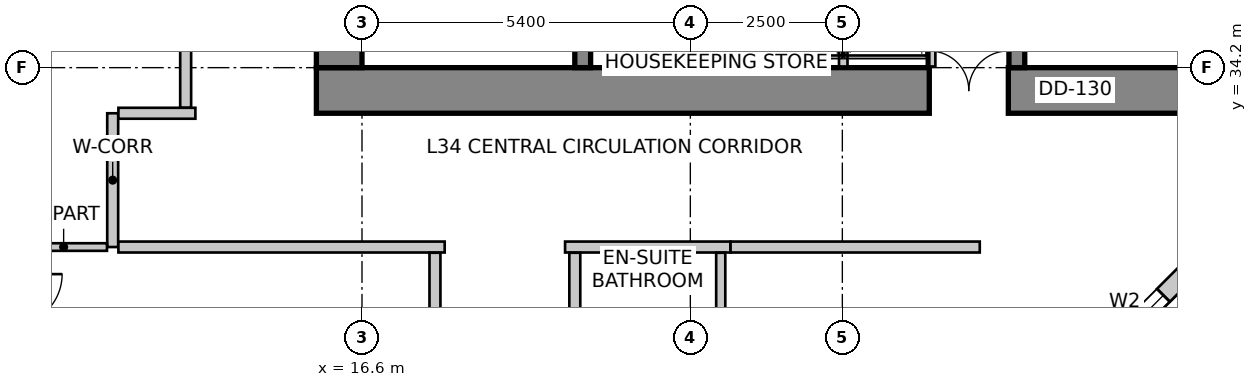
"""IFC4 building model, lengths in metres.
Left out: names, types, materials, properties, quantities, classifications, styles, units other than length and angle.
Written with IfcOpenShell. Run it as: python <this file> out.ifc"""

import sys

from ifc_helpers import new_model, si_unit, direction, frame, frame_2d, origin, place, context, subcontext, project, spatial, rectangle, extrude, source, transform, mapped, element, fill, save


model = new_model("IFC4")
c1 = context("Model", 3, precision=1e-05, world=origin(), true_north=direction((0.0, 1.0)))
c2 = subcontext(c1, "Body", "Model", "MODEL_VIEW")
j1 = project(units=[si_unit("LENGTHUNIT", "METRE"), si_unit("PLANEANGLEUNIT", "RADIAN")], contexts=[c1])
p1 = place(None, origin())
s1 = spatial("IfcSite", under=j1, at=p1, CompositionType="ELEMENT")
p2 = place(p1, origin())
s2 = spatial("IfcBuilding", under=s1, at=p2, CompositionType="ELEMENT")
p3 = place(p2, frame((0.0, 0.0, 139.4)))
s3 = spatial("IfcBuildingStorey", under=s2, at=p3, CompositionType="ELEMENT", Elevation=139.4)
p4 = place(p3, frame((15.85, 33.825, 0.0), z_axis=(0.0, 0.0, 1.0), x_axis=(1.0, 0.0, 0.0)))
e1 = element("IfcWall", 1, at=p4, inside=s3, PredefinedType="SHEAR", context=c2, shape_type="SweptSolid", body=[
    extrude(rectangle(XDim=15.9, YDim=0.75, at=frame_2d((7.95, 0.0))), origin(), (0.0, 0.0, 1.0), 3.6),
])
m1 = source(origin(), c2, "Body", "SweptSolid", [
    extrude(rectangle(XDim=1.3, YDim=2.15, at=frame_2d((0.65, 1.075))), frame((0.0, 0.385, 0.0), z_axis=(0.0, -1.0, 0.0), x_axis=(1.0, 0.0, 0.0)), (0.0, 0.0, 1.0), 0.77),
])
p5 = place(p4, frame((10.08, 0.0, 0.0)))
e2 = element("IfcOpeningElement", 2, at=p5, cuts=e1, PredefinedType="OPENING", context=c2, shape_type="MappedRepresentation", body=[
    mapped(m1, transform((0.0, 0.0, 0.0), scale=1.0)),
])
p6 = place(p3, frame((16.225, 34.2, 0.0), z_axis=(0.0, 0.0, 1.0), x_axis=(0.0, 1.0, 0.0)))
e3 = element("IfcWall", 3, at=p6, inside=s3, PredefinedType="SHEAR", context=c2, shape_type="SweptSolid", body=[
    extrude(rectangle(XDim=11.4, YDim=0.75, at=frame_2d((5.7, 0.0))), origin(), (0.0, 0.0, 1.0), 3.6),
])
m2 = source(origin(), c2, "Body", "SweptSolid", [
    extrude(rectangle(XDim=1.1, YDim=2.15, at=frame_2d((0.55, 1.075))), frame((0.0, 0.385, 0.0), z_axis=(0.0, -1.0, 0.0), x_axis=(1.0, 0.0, 0.0)), (0.0, 0.0, 1.0), 0.77),
])
p7 = place(p6, frame((7.15, 0.0, 0.0)))
e4 = element("IfcOpeningElement", 4, at=p7, cuts=e3, PredefinedType="OPENING", context=c2, shape_type="MappedRepresentation", body=[
    mapped(m2, transform((0.0, 0.0, 0.0), scale=1.0)),
])
p8 = place(p3, frame((20.23, 34.2, 0.0), z_axis=(0.0, 0.0, 1.0), x_axis=(0.0, 1.0, 0.0)))
e5 = element("IfcWall", 5, at=p8, inside=s3, PredefinedType="SHEAR", context=c2, shape_type="SweptSolid", body=[
    extrude(rectangle(XDim=9.06, YDim=0.26, at=frame_2d((4.53, 0.0))), origin(), (0.0, 0.0, 1.0), 3.6),
])
m3 = source(origin(), c2, "Body", "SweptSolid", [
    extrude(rectangle(XDim=1.1, YDim=2.15, at=frame_2d((0.55, 1.075))), frame((0.0, 0.14, 0.0), z_axis=(0.0, -1.0, 0.0), x_axis=(1.0, 0.0, 0.0)), (0.0, 0.0, 1.0), 0.28),
])
p9 = place(p8, frame((7.45, 0.0, 0.0)))
e6 = element("IfcOpeningElement", 6, at=p9, cuts=e5, PredefinedType="OPENING", context=c2, shape_type="MappedRepresentation", body=[
    mapped(m3, transform((0.0, 0.0, 0.0), scale=1.0)),
])
p10 = place(p3, frame((27.37, 34.2, 0.0), z_axis=(0.0, 0.0, 1.0), x_axis=(0.0, 1.0, 0.0)))
e7 = element("IfcWall", 7, at=p10, inside=s3, PredefinedType="SHEAR", context=c2, shape_type="SweptSolid", body=[
    extrude(rectangle(XDim=9.06, YDim=0.26, at=frame_2d((4.53, 0.0))), origin(), (0.0, 0.0, 1.0), 3.6),
])
p11 = place(p10, frame((7.45, 0.0, 0.0)))
e8 = element("IfcOpeningElement", 8, at=p11, cuts=e7, PredefinedType="OPENING", context=c2, shape_type="MappedRepresentation", body=[
    mapped(m3, transform((0.0, 0.0, 0.0), scale=1.0)),
])
p12 = place(p3, frame((28.116, 28.792, 0.0), z_axis=(0.0, 0.0, 1.0), x_axis=(0.707064797706, 0.707148762175, 0.0)))
e9 = element("IfcWall", 9, at=p12, inside=s3, PredefinedType="SOLIDWALL", context=c2, shape_type="SweptSolid", body=[
    extrude(rectangle(XDim=2.908, YDim=0.3, at=frame_2d((1.454, 0.0))), origin(), (0.0, 0.0, 1.0), 3.35),
])
m4 = source(origin(), c2, "Body", "SweptSolid", [
    extrude(rectangle(XDim=1.8, YDim=2.1, at=frame_2d((0.9, 1.05))), frame((0.0, 0.16, 0.0), z_axis=(0.0, -1.0, 0.0), x_axis=(1.0, 0.0, 0.0)), (0.0, 0.0, 1.0), 0.32),
])
p13 = place(p12, frame((0.554, 0.0, 0.85)))
e10 = element("IfcOpeningElement", 10, at=p13, cuts=e9, PredefinedType="OPENING", context=c2, shape_type="MappedRepresentation", body=[
    mapped(m4, transform((0.0, 0.0, 0.0), scale=1.0)),
])
p14 = place(p3, frame((13.269, 47.134, 0.0), z_axis=(0.0, 0.0, 1.0), x_axis=(-0.319929773322, -0.947441259468, 0.0)))
e11 = element("IfcWall", 11, at=p14, inside=s3, PredefinedType="SOLIDWALL", context=c2, shape_type="SweptSolid", body=[
    extrude(rectangle(XDim=16.134, YDim=0.3, at=frame_2d((8.067, 0.0))), origin(), (0.0, 0.0, 1.0), 3.35),
])
m5 = source(origin(), c2, "Body", "SweptSolid", [
    extrude(rectangle(XDim=2.4, YDim=2.2, at=frame_2d((1.2, 1.1))), frame((0.0, 0.16, 0.0), z_axis=(0.0, -1.0, 0.0), x_axis=(1.0, 0.0, 0.0)), (0.0, 0.0, 1.0), 0.32),
])
p15 = place(p14, frame((2.276, 0.0, 0.85)))
e12 = element("IfcOpeningElement", 12, at=p15, cuts=e11, PredefinedType="OPENING", context=c2, shape_type="MappedRepresentation", body=[
    mapped(m5, transform((0.0, 0.0, 0.0), scale=1.0)),
])
m6 = source(origin(), c2, "Body", "SweptSolid", [
    extrude(rectangle(XDim=2.1, YDim=2.0, at=frame_2d((1.05, 1.0))), frame((0.0, 0.16, 0.0), z_axis=(0.0, -1.0, 0.0), x_axis=(1.0, 0.0, 0.0)), (0.0, 0.0, 1.0), 0.32),
])
p16 = place(p14, frame((7.361, 0.0, 0.85)))
e13 = element("IfcOpeningElement", 13, at=p16, cuts=e11, PredefinedType="OPENING", context=c2, shape_type="MappedRepresentation", body=[
    mapped(m6, transform((0.0, 0.0, 0.0), scale=1.0)),
])
p17 = place(p14, frame((12.146, 0.0, 0.85)))
e14 = element("IfcOpeningElement", 14, at=p17, cuts=e11, PredefinedType="OPENING", context=c2, shape_type="MappedRepresentation", body=[
    mapped(m5, transform((0.0, 0.0, 0.0), scale=1.0)),
])
p18 = place(p3, frame((8.187, 31.834, 0.0), z_axis=(0.0, 0.0, 1.0), x_axis=(0.198869838988, -0.980025911464, 0.0)))
e15 = element("IfcWall", 15, at=p18, inside=s3, PredefinedType="SOLIDWALL", context=c2, shape_type="SweptSolid", body=[
    extrude(rectangle(XDim=16.363, YDim=0.3, at=frame_2d((8.182, 0.0))), origin(), (0.0, 0.0, 1.0), 3.35),
])
m7 = source(origin(), c2, "Body", "SweptSolid", [
    extrude(rectangle(XDim=1.2, YDim=1.6, at=frame_2d((0.6, 0.8))), frame((0.0, 0.16, 0.0), z_axis=(0.0, -1.0, 0.0), x_axis=(1.0, 0.0, 0.0)), (0.0, 0.0, 1.0), 0.32),
])
p19 = place(p18, frame((1.131, 0.0, 0.85)))
e16 = element("IfcOpeningElement", 16, at=p19, cuts=e15, PredefinedType="OPENING", context=c2, shape_type="MappedRepresentation", body=[
    mapped(m7, transform((0.0, 0.0, 0.0), scale=1.0)),
])
p20 = place(p18, frame((4.38, 0.0, 0.85)))
e17 = element("IfcOpeningElement", 17, at=p20, cuts=e15, PredefinedType="OPENING", context=c2, shape_type="MappedRepresentation", body=[
    mapped(m6, transform((0.0, 0.0, 0.0), scale=1.0)),
])
p21 = place(p18, frame((8.539, 0.0, 0.85)))
e18 = element("IfcOpeningElement", 18, at=p21, cuts=e15, PredefinedType="OPENING", context=c2, shape_type="MappedRepresentation", body=[
    mapped(m7, transform((0.0, 0.0, 0.0), scale=1.0)),
])
p22 = place(p18, frame((12.212, 0.0, 0.85)))
e19 = element("IfcOpeningElement", 19, at=p22, cuts=e15, PredefinedType="OPENING", context=c2, shape_type="MappedRepresentation", body=[
    mapped(m6, transform((0.0, 0.0, 0.0), scale=1.0)),
])
for number, where, z_axis, x_axis in (
    (20, (25.96, 34.22, 0.0), (0.0, 0.0, 1.0), (0.0, 1.0, 0.0)),
    (21, (23.07, 34.22, 0.0), (0.0, 0.0, 1.0), (0.0, 1.0, 0.0)),
    (22, (24.515, 34.22, 0.0), (0.0, 0.0, 1.0), (0.0, 1.0, 0.0)),
):
    element("IfcWall", number, at=place(p3, frame(where, z_axis=z_axis, x_axis=x_axis)), inside=s3, PredefinedType="SOLIDWALL", context=c2, shape_type="SweptSolid", body=[
        extrude(rectangle(XDim=1.62, YDim=0.14, at=frame_2d((0.81, 0.0))), origin(), (0.0, 0.0, 1.0), 2.642),
    ])
p23 = place(p3, frame((12.5, 31.25, 0.0), z_axis=(0.0, 0.0, 1.0), x_axis=(0.0, 1.0, 0.0)))
e23 = element("IfcWall", 23, at=p23, inside=s3, PredefinedType="PARTITIONING", context=c2, shape_type="SweptSolid", body=[
    extrude(rectangle(XDim=2.2, YDim=0.18, at=frame_2d((1.1, 0.0))), origin(), (0.0, 0.0, 1.0), 3.019),
])
p24 = place(p3, frame((12.594, 33.45, 0.0), z_axis=(0.0, 0.0, 1.0), x_axis=(1.0, 0.0, 0.0)))
e24 = element("IfcWall", 24, at=p24, inside=s3, PredefinedType="PARTITIONING", context=c2, shape_type="SweptSolid", body=[
    extrude(rectangle(XDim=1.266, YDim=0.18, at=frame_2d((0.633, 0.0))), origin(), (0.0, 0.0, 1.0), 3.35),
])
p25 = place(p3, frame((17.96, 31.25, 0.0), z_axis=(0.0, 0.0, 1.0), x_axis=(-1.0, 0.0, 0.0)))
e25 = element("IfcWall", 25, at=p25, inside=s3, PredefinedType="PARTITIONING", context=c2, shape_type="SweptSolid", body=[
    extrude(rectangle(XDim=5.366, YDim=0.18, at=frame_2d((2.683, 0.0))), origin(), (0.0, 0.0, 1.0), 3.019),
])
p26 = place(p3, frame((22.66, 31.25, 0.0), z_axis=(0.0, 0.0, 1.0), x_axis=(-1.0, 0.0, 0.0)))
e26 = element("IfcWall", 26, at=p26, inside=s3, PredefinedType="PARTITIONING", context=c2, shape_type="SweptSolid", body=[
    extrude(rectangle(XDim=2.72, YDim=0.18, at=frame_2d((1.36, 0.0))), origin(), (0.0, 0.0, 1.0), 3.019),
])
p27 = place(p3, frame((26.76, 31.25, 0.0), z_axis=(0.0, 0.0, 1.0), x_axis=(-1.0, 0.0, 0.0)))
e27 = element("IfcWall", 27, at=p27, inside=s3, PredefinedType="PARTITIONING", context=c2, shape_type="SweptSolid", body=[
    extrude(rectangle(XDim=4.098, YDim=0.18, at=frame_2d((2.049, 0.0))), origin(), (0.0, 0.0, 1.0), 3.35),
])
p28 = place(p3, frame((13.7, 33.544, 0.0), z_axis=(0.0, 0.0, 1.0), x_axis=(0.0, 1.0, 0.0)))
e28 = element("IfcWall", 28, at=p28, inside=s3, PredefinedType="PARTITIONING", context=c2, shape_type="SweptSolid", body=[
    extrude(rectangle(XDim=13.86, YDim=0.18, at=frame_2d((6.93, 0.0))), origin(), (0.0, 0.0, 1.0), 2.492),
])
m8 = source(origin(), c2, "Body", "SweptSolid", [
    extrude(rectangle(XDim=0.9, YDim=2.15, at=frame_2d((0.45, 1.075))), frame((0.0, 0.1, 0.0), z_axis=(0.0, -1.0, 0.0), x_axis=(1.0, 0.0, 0.0)), (0.0, 0.0, 1.0), 0.2),
])
p29 = place(p28, frame((4.253, 0.0, 0.0)))
e29 = element("IfcOpeningElement", 29, at=p29, cuts=e28, PredefinedType="OPENING", context=c2, shape_type="MappedRepresentation", body=[
    mapped(m8, transform((0.0, 0.0, 0.0), scale=1.0)),
])
p30 = place(p3, frame((12.406, 31.25, 0.0), z_axis=(0.0, 0.0, 1.0), x_axis=(-1.0, 0.0, 0.0)))
e30 = element("IfcWall", 30, at=p30, inside=s3, PredefinedType="PARTITIONING", context=c2, shape_type="SweptSolid", body=[
    extrude(rectangle(XDim=1.426, YDim=0.125, at=frame_2d((0.713, 0.0))), origin(), (0.0, 0.0, 1.0), 2.492),
])
p31 = place(p3, frame((17.8, 23.84, 0.0), z_axis=(0.0, 0.0, 1.0), x_axis=(0.0, 1.0, 0.0)))
e31 = element("IfcWall", 31, at=p31, inside=s3, PredefinedType="PARTITIONING", context=c2, shape_type="SweptSolid", body=[
    extrude(rectangle(XDim=7.316, YDim=0.18, at=frame_2d((3.658, 0.0))), origin(), (0.0, 0.0, 1.0), 2.803),
])
p32 = place(p31, frame((3.208, 0.0, 0.0)))
e32 = element("IfcOpeningElement", 32, at=p32, cuts=e31, PredefinedType="OPENING", context=c2, shape_type="MappedRepresentation", body=[
    mapped(m8, transform((0.0, 0.0, 0.0), scale=1.0)),
])
p33 = place(p3, frame((20.1, 31.156, 0.0), z_axis=(0.0, 0.0, 1.0), x_axis=(0.0, -1.0, 0.0)))
e33 = element("IfcWall", 33, at=p33, inside=s3, PredefinedType="PARTITIONING", context=c2, shape_type="SweptSolid", body=[
    extrude(rectangle(XDim=2.266, YDim=0.18, at=frame_2d((1.133, 0.0))), origin(), (0.0, 0.0, 1.0), 3.019),
])
p34 = place(p3, frame((22.5, 31.156, 0.0), z_axis=(0.0, 0.0, 1.0), x_axis=(0.0, -1.0, 0.0)))
e34 = element("IfcWall", 34, at=p34, inside=s3, PredefinedType="PARTITIONING", context=c2, shape_type="SweptSolid", body=[
    extrude(rectangle(XDim=2.027, YDim=0.15, at=frame_2d((1.014, 0.0))), origin(), (0.0, 0.0, 1.0), 3.019),
])
m9 = source(origin(), c2, "Body", "SweptSolid", [
    extrude(rectangle(XDim=1.8, YDim=2.1, at=frame_2d((0.9, 1.05))), frame((0.0, -0.015, 0.0), z_axis=(0.0, -1.0, 0.0), x_axis=(1.0, 0.0, 0.0)), (0.0, 0.0, 1.0), 0.06),
])
p35 = place(p13, origin())
e35 = element("IfcWindow", 35, at=p35, inside=s3, PartitioningType="SINGLE_PANEL", PredefinedType="WINDOW", context=c2, shape_type="MappedRepresentation", body=[
    mapped(m9, transform((0.0, 0.0, 0.0), scale=1.0)),
])
fill(e10, e35)
m10 = source(origin(), c2, "Body", "SweptSolid", [
    extrude(rectangle(XDim=1.3, YDim=2.15, at=frame_2d((0.65, 1.075))), frame((0.0, 0.025, 0.0), z_axis=(0.0, -1.0, 0.0), x_axis=(1.0, 0.0, 0.0)), (0.0, 0.0, 1.0), 0.05),
])
p36 = place(p5, origin())
e36 = element("IfcDoor", 36, at=p36, inside=s3, OperationType="DOUBLE_DOOR_SINGLE_SWING", PredefinedType="DOOR", context=c2, shape_type="MappedRepresentation", body=[
    mapped(m10, transform((0.0, 0.0, 0.0), scale=1.0)),
])
fill(e2, e36)
save(model, sys.argv[1])
